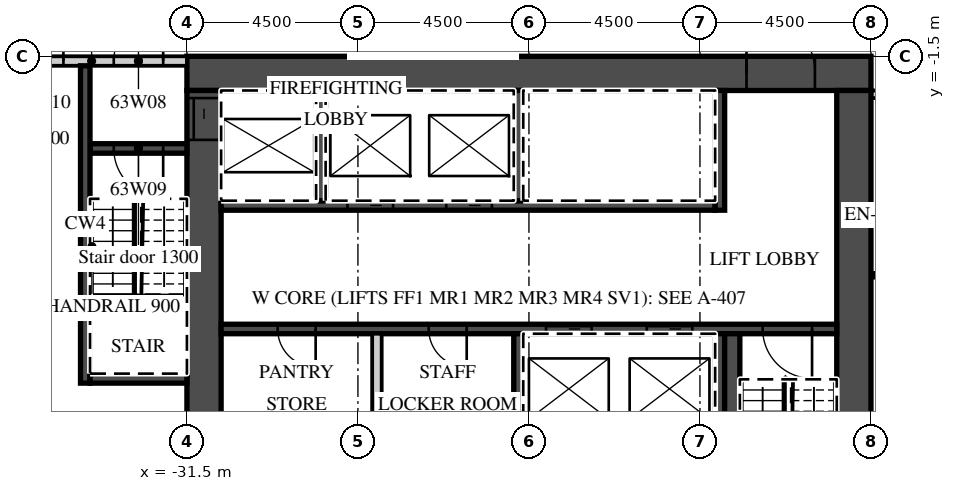
"""IFC4 building model, lengths in metres.
Left out: names, types, materials, properties, quantities, classifications, styles, units other than length and angle.
Written with IfcOpenShell. Run it as: python <this file> out.ifc"""

import sys

from ifc_helpers import new_model, si_unit, direction, frame, frame_2d, origin, place, context, subcontext, project, spatial, rectangle, extrude, element, fill, save


model = new_model("IFC4")
c1 = context("Model", 3, precision=1e-05, world=origin(), true_north=direction((0.0, 1.0)))
c2 = subcontext(c1, "Body", "Model", "MODEL_VIEW")
j1 = project(units=[si_unit("LENGTHUNIT", "METRE"), si_unit("PLANEANGLEUNIT", "RADIAN")], contexts=[c1])
p1 = place(None, origin())
s1 = spatial("IfcSite", under=j1, at=p1, CompositionType="ELEMENT")
p2 = place(p1, origin())
s2 = spatial("IfcBuilding", under=s1, at=p2, CompositionType="ELEMENT")
p3 = place(p2, frame((0.0, 0.0, 254.0)))
s3 = spatial("IfcBuildingStorey", under=s2, at=p3, CompositionType="ELEMENT", Elevation=254.0)
p4 = place(p3, frame((-13.5, -2.5, 0.0), z_axis=(0.0, 0.0, 1.0), x_axis=(1.0, 0.0, 0.0)))
e1 = element("IfcWall", 1, at=p4, inside=s3, PredefinedType="PARTITIONING", context=c2, shape_type="SweptSolid", body=[
    extrude(rectangle(XDim=27.0, YDim=0.2, at=frame_2d((13.5, 0.0))), origin(), (0.0, 0.0, 1.0), 3.0),
])
p5 = place(p4, frame((2.925, 0.0, 0.0)))
e2 = element("IfcOpeningElement", 2, at=p5, cuts=e1, PredefinedType="OPENING", context=c2, shape_type="SweptSolid", body=[
    extrude(rectangle(XDim=1.0, YDim=2.1, at=frame_2d((0.5, 1.05))), frame((0.0, 0.11, 0.0), z_axis=(0.0, -1.0, 0.0), x_axis=(1.0, 0.0, 0.0)), (0.0, 0.0, 1.0), 0.22),
])
p6 = place(p4, frame((6.938, 0.0, 0.0)))
e3 = element("IfcOpeningElement", 3, at=p6, cuts=e1, PredefinedType="OPENING", context=c2, shape_type="SweptSolid", body=[
    extrude(rectangle(XDim=1.2, YDim=2.1, at=frame_2d((0.6, 1.05))), frame((0.0, 0.11, 0.0), z_axis=(0.0, -1.0, 0.0), x_axis=(1.0, 0.0, 0.0)), (0.0, 0.0, 1.0), 0.22),
])
p7 = place(p4, frame((18.862, 0.0, 0.0)))
e4 = element("IfcOpeningElement", 4, at=p7, cuts=e1, PredefinedType="OPENING", context=c2, shape_type="SweptSolid", body=[
    extrude(rectangle(XDim=1.2, YDim=2.1, at=frame_2d((0.6, 1.05))), frame((0.0, 0.11, 0.0), z_axis=(0.0, -1.0, 0.0), x_axis=(1.0, 0.0, 0.0)), (0.0, 0.0, 1.0), 0.22),
])
p8 = place(p4, frame((23.075, 0.0, 0.0)))
e5 = element("IfcOpeningElement", 5, at=p8, cuts=e1, PredefinedType="OPENING", context=c2, shape_type="SweptSolid", body=[
    extrude(rectangle(XDim=1.0, YDim=2.1, at=frame_2d((0.5, 1.05))), frame((0.0, 0.11, 0.0), z_axis=(0.0, -1.0, 0.0), x_axis=(1.0, 0.0, 0.0)), (0.0, 0.0, 1.0), 0.22),
])
p9 = place(p3, frame((-31.5, -1.95, 0.0), z_axis=(0.0, 0.0, 1.0), x_axis=(1.0, 0.0, 0.0)))
e6 = element("IfcWall", 6, at=p9, inside=s3, PredefinedType="SHEAR", context=c2, shape_type="SweptSolid", body=[
    extrude(rectangle(XDim=18.0, YDim=0.9, at=frame_2d((9.0, 0.0))), origin(), (0.0, 0.0, 1.0), 3.0),
])
p10 = place(p9, frame((14.725, 0.0, 0.0)))
e7 = element("IfcOpeningElement", 7, at=p10, cuts=e6, PredefinedType="OPENING", context=c2, shape_type="SweptSolid", body=[
    extrude(rectangle(XDim=1.8, YDim=2.1, at=frame_2d((0.9, 1.05))), frame((0.0, 0.46, 0.0), z_axis=(0.0, -1.0, 0.0), x_axis=(1.0, 0.0, 0.0)), (0.0, 0.0, 1.0), 0.92),
])
p11 = place(p3, frame((-31.05, -15.2, 0.0), z_axis=(0.0, 0.0, 1.0), x_axis=(0.0, 1.0, 0.0)))
e8 = element("IfcWall", 8, at=p11, inside=s3, PredefinedType="SHEAR", context=c2, shape_type="SweptSolid", body=[
    extrude(rectangle(XDim=12.8, YDim=0.9, at=frame_2d((6.4, 0.0))), origin(), (0.0, 0.0, 1.0), 3.0),
])
p12 = place(p11, frame((11.5, 0.0, 0.0)))
e9 = element("IfcOpeningElement", 9, at=p12, cuts=e8, PredefinedType="OPENING", context=c2, shape_type="SweptSolid", body=[
    extrude(rectangle(XDim=1.1, YDim=2.1, at=frame_2d((0.55, 1.05))), frame((0.0, 0.46, 0.0), z_axis=(0.0, -1.0, 0.0), x_axis=(1.0, 0.0, 0.0)), (0.0, 0.0, 1.0), 0.92),
])
p13 = place(p3, frame((-13.95, -14.6, 0.0), z_axis=(0.0, 0.0, 1.0), x_axis=(0.0, 1.0, 0.0)))
e10 = element("IfcWall", 10, at=p13, inside=s3, PredefinedType="SHEAR", context=c2, shape_type="SweptSolid", body=[
    extrude(rectangle(XDim=12.2, YDim=0.9, at=frame_2d((6.1, 0.0))), origin(), (0.0, 0.0, 1.0), 3.0),
])
p14 = place(p3, frame((-30.6, -5.425, 0.0), z_axis=(0.0, 0.0, 1.0), x_axis=(1.0, 0.0, 0.0)))
e11 = element("IfcWall", 11, at=p14, inside=s3, PredefinedType="SHEAR", context=c2, shape_type="SweptSolid", body=[
    extrude(rectangle(XDim=13.0, YDim=0.25, at=frame_2d((6.5, 0.0))), origin(), (0.0, 0.0, 1.0), 3.0),
])
p15 = place(p14, frame((3.325, 0.0, 0.0)))
e12 = element("IfcOpeningElement", 12, at=p15, cuts=e11, PredefinedType="OPENING", context=c2, shape_type="SweptSolid", body=[
    extrude(rectangle(XDim=1.2, YDim=2.1, at=frame_2d((0.6, 1.05))), frame((0.0, 0.135, 0.0), z_axis=(0.0, -1.0, 0.0), x_axis=(1.0, 0.0, 0.0)), (0.0, 0.0, 1.0), 0.27),
])
p16 = place(p14, frame((5.925, 0.0, 0.0)))
e13 = element("IfcOpeningElement", 13, at=p16, cuts=e11, PredefinedType="OPENING", context=c2, shape_type="SweptSolid", body=[
    extrude(rectangle(XDim=1.2, YDim=2.1, at=frame_2d((0.6, 1.05))), frame((0.0, 0.135, 0.0), z_axis=(0.0, -1.0, 0.0), x_axis=(1.0, 0.0, 0.0)), (0.0, 0.0, 1.0), 0.27),
])
p17 = place(p3, frame((-17.475, -5.55, 0.0), z_axis=(0.0, 0.0, 1.0), x_axis=(0.0, 1.0, 0.0)))
e14 = element("IfcWall", 14, at=p17, inside=s3, PredefinedType="SHEAR", context=c2, shape_type="SweptSolid", body=[
    extrude(rectangle(XDim=3.15, YDim=0.25, at=frame_2d((1.575, 0.0))), origin(), (0.0, 0.0, 1.0), 3.0),
])
for number, where, z_axis, x_axis in (
    (15, (-27.975, -5.3, 0.0), (0.0, 0.0, 1.0), (0.0, 1.0, 0.0)),
    (16, (-22.775, -5.3, 0.0), (0.0, 0.0, 1.0), (0.0, 1.0, 0.0)),
):
    element("IfcWall", number, at=place(p3, frame(where, z_axis=z_axis, x_axis=x_axis)), inside=s3, PredefinedType="SHEAR", context=c2, shape_type="SweptSolid", body=[
        extrude(rectangle(XDim=2.9, YDim=0.25, at=frame_2d((1.45, 0.0))), origin(), (0.0, 0.0, 1.0), 3.0),
    ])
p18 = place(p3, frame((-30.6, -8.675, 0.0), z_axis=(0.0, 0.0, 1.0), x_axis=(1.0, 0.0, 0.0)))
e17 = element("IfcWall", 17, at=p18, inside=s3, PredefinedType="SHEAR", context=c2, shape_type="SweptSolid", body=[
    extrude(rectangle(XDim=16.2, YDim=0.25, at=frame_2d((8.1, 0.0))), origin(), (0.0, 0.0, 1.0), 3.0),
])
p19 = place(p18, frame((8.55, 0.0, 0.0)))
e18 = element("IfcOpeningElement", 18, at=p19, cuts=e17, PredefinedType="OPENING", context=c2, shape_type="SweptSolid", body=[
    extrude(rectangle(XDim=1.2, YDim=2.1, at=frame_2d((0.6, 1.05))), frame((0.0, 0.135, 0.0), z_axis=(0.0, -1.0, 0.0), x_axis=(1.0, 0.0, 0.0)), (0.0, 0.0, 1.0), 0.27),
])
p20 = place(p18, frame((11.2, 0.0, 0.0)))
e19 = element("IfcOpeningElement", 19, at=p20, cuts=e17, PredefinedType="OPENING", context=c2, shape_type="SweptSolid", body=[
    extrude(rectangle(XDim=1.2, YDim=2.1, at=frame_2d((0.6, 1.05))), frame((0.0, 0.135, 0.0), z_axis=(0.0, -1.0, 0.0), x_axis=(1.0, 0.0, 0.0)), (0.0, 0.0, 1.0), 0.27),
])
p21 = place(p18, frame((14.25, 0.0, 0.0)))
e20 = element("IfcOpeningElement", 20, at=p21, cuts=e17, PredefinedType="OPENING", context=c2, shape_type="SweptSolid", body=[
    extrude(rectangle(XDim=1.3, YDim=2.1, at=frame_2d((0.65, 1.05))), frame((0.0, 0.135, 0.0), z_axis=(0.0, -1.0, 0.0), x_axis=(1.0, 0.0, 0.0)), (0.0, 0.0, 1.0), 0.27),
])
p22 = place(p18, frame((1.488, 0.0, 0.0)))
e21 = element("IfcOpeningElement", 21, at=p22, cuts=e17, PredefinedType="OPENING", context=c2, shape_type="SweptSolid", body=[
    extrude(rectangle(XDim=1.0, YDim=2.1, at=frame_2d((0.5, 1.05))), frame((0.0, 0.135, 0.0), z_axis=(0.0, -1.0, 0.0), x_axis=(1.0, 0.0, 0.0)), (0.0, 0.0, 1.0), 0.27),
])
p23 = place(p18, frame((5.462, 0.0, 0.0)))
e22 = element("IfcOpeningElement", 22, at=p23, cuts=e17, PredefinedType="OPENING", context=c2, shape_type="SweptSolid", body=[
    extrude(rectangle(XDim=1.0, YDim=2.1, at=frame_2d((0.5, 1.05))), frame((0.0, 0.135, 0.0), z_axis=(0.0, -1.0, 0.0), x_axis=(1.0, 0.0, 0.0)), (0.0, 0.0, 1.0), 0.27),
])
for number, where, z_axis, x_axis in (
    (23, (-17.475, -11.7, 0.0), (0.0, 0.0, 1.0), (0.0, 1.0, 0.0)),
    (24, (-22.775, -11.7, 0.0), (0.0, 0.0, 1.0), (0.0, 1.0, 0.0)),
):
    element("IfcWall", number, at=place(p3, frame(where, z_axis=z_axis, x_axis=x_axis)), inside=s3, PredefinedType="SHEAR", context=c2, shape_type="SweptSolid", body=[
        extrude(rectangle(XDim=2.9, YDim=0.25, at=frame_2d((1.45, 0.0))), origin(), (0.0, 0.0, 1.0), 3.0),
    ])
p24 = place(p3, frame((-26.5, -11.7, 0.0), z_axis=(0.0, 0.0, 1.0), x_axis=(0.0, 1.0, 0.0)))
e25 = element("IfcWall", 25, at=p24, inside=s3, PredefinedType="PARTITIONING", context=c2, shape_type="SweptSolid", body=[
    extrude(rectangle(XDim=2.9, YDim=0.25, at=frame_2d((1.45, 0.0))), origin(), (0.0, 0.0, 1.0), 3.0),
])
p25 = place(p3, frame((-17.15, -14.6, 0.0), z_axis=(0.0, 0.0, 1.0), x_axis=(0.0, 1.0, 0.0)))
e26 = element("IfcWall", 26, at=p25, inside=s3, PredefinedType="SHEAR", context=c2, shape_type="SweptSolid", body=[
    extrude(rectangle(XDim=5.8, YDim=0.4, at=frame_2d((2.9, 0.0))), origin(), (0.0, 0.0, 1.0), 3.0),
])
p26 = place(p3, frame((-36.515, -1.625, 0.0), z_axis=(0.0, 0.0, 1.0), x_axis=(1.0, 0.0, 0.0)))
e27 = element("IfcWall", 27, at=p26, inside=s3, PredefinedType="PARTITIONING", context=c2, shape_type="SweptSolid", body=[
    extrude(rectangle(XDim=5.015, YDim=0.25, at=frame_2d((2.508, 0.0))), origin(), (0.0, 0.0, 1.0), 3.0),
])
p27 = place(p26, frame((3.09, 0.0, 0.0)))
e28 = element("IfcOpeningElement", 28, at=p27, cuts=e27, PredefinedType="OPENING", context=c2, shape_type="SweptSolid", body=[
    extrude(rectangle(XDim=1.3, YDim=2.1, at=frame_2d((0.65, 1.05))), frame((0.0, 0.135, 0.0), z_axis=(0.0, -1.0, 0.0), x_axis=(1.0, 0.0, 0.0)), (0.0, 0.0, 1.0), 0.27),
])
p28 = place(p26, frame((0.665, 0.0, 0.0)))
e29 = element("IfcOpeningElement", 29, at=p28, cuts=e27, PredefinedType="OPENING", context=c2, shape_type="SweptSolid", body=[
    extrude(rectangle(XDim=1.1, YDim=2.1, at=frame_2d((0.55, 1.05))), frame((0.0, 0.135, 0.0), z_axis=(0.0, -1.0, 0.0), x_axis=(1.0, 0.0, 0.0)), (0.0, 0.0, 1.0), 0.27),
])
p29 = place(p3, frame((-34.05, -3.925, 0.0), z_axis=(0.0, 0.0, 1.0), x_axis=(1.0, 0.0, 0.0)))
e30 = element("IfcWall", 30, at=p29, inside=s3, PredefinedType="SHEAR", context=c2, shape_type="SweptSolid", body=[
    extrude(rectangle(XDim=2.55, YDim=0.25, at=frame_2d((1.275, 0.0))), origin(), (0.0, 0.0, 1.0), 3.0),
])
p30 = place(p29, frame((0.625, 0.0, 0.0)))
e31 = element("IfcOpeningElement", 31, at=p30, cuts=e30, PredefinedType="OPENING", context=c2, shape_type="SweptSolid", body=[
    extrude(rectangle(XDim=1.3, YDim=2.1, at=frame_2d((0.65, 1.05))), frame((0.0, 0.135, 0.0), z_axis=(0.0, -1.0, 0.0), x_axis=(1.0, 0.0, 0.0)), (0.0, 0.0, 1.0), 0.27),
])
p31 = place(p3, frame((-34.175, -10.1, 0.0), z_axis=(0.0, 0.0, 1.0), x_axis=(0.0, 1.0, 0.0)))
e32 = element("IfcWall", 32, at=p31, inside=s3, PredefinedType="SHEAR", context=c2, shape_type="SweptSolid", body=[
    extrude(rectangle(XDim=8.35, YDim=0.25, at=frame_2d((4.175, 0.0))), origin(), (0.0, 0.0, 1.0), 3.0),
])
p32 = place(p3, frame((-34.05, -9.975, 0.0), z_axis=(0.0, 0.0, 1.0), x_axis=(1.0, 0.0, 0.0)))
e33 = element("IfcWall", 33, at=p32, inside=s3, PredefinedType="SHEAR", context=c2, shape_type="SweptSolid", body=[
    extrude(rectangle(XDim=2.55, YDim=0.25, at=frame_2d((1.275, 0.0))), origin(), (0.0, 0.0, 1.0), 3.0),
])
p33 = place(p19, origin())
e34 = element("IfcDoor", 34, at=p33, inside=s3, OperationType="SLIDING_TO_LEFT", PredefinedType="DOOR", context=c2, shape_type="SweptSolid", body=[
    extrude(rectangle(XDim=1.2, YDim=2.1, at=frame_2d((0.6, 1.05))), frame((0.0, 0.025, 0.0), z_axis=(0.0, -1.0, 0.0), x_axis=(1.0, 0.0, 0.0)), (0.0, 0.0, 1.0), 0.05),
])
fill(e18, e34)
p34 = place(p20, origin())
e35 = element("IfcDoor", 35, at=p34, inside=s3, OperationType="SLIDING_TO_RIGHT", PredefinedType="DOOR", context=c2, shape_type="SweptSolid", body=[
    extrude(rectangle(XDim=1.2, YDim=2.1, at=frame_2d((0.6, 1.05))), frame((0.0, 0.025, 0.0), z_axis=(0.0, -1.0, 0.0), x_axis=(1.0, 0.0, 0.0)), (0.0, 0.0, 1.0), 0.05),
])
fill(e19, e35)
p35 = place(p15, origin())
e36 = element("IfcDoor", 36, at=p35, inside=s3, OperationType="SLIDING_TO_RIGHT", PredefinedType="DOOR", context=c2, shape_type="SweptSolid", body=[
    extrude(rectangle(XDim=1.2, YDim=2.1, at=frame_2d((0.6, 1.05))), frame((0.0, 0.025, 0.0), z_axis=(0.0, -1.0, 0.0), x_axis=(1.0, 0.0, 0.0)), (0.0, 0.0, 1.0), 0.05),
])
fill(e12, e36)
p36 = place(p16, origin())
e37 = element("IfcDoor", 37, at=p36, inside=s3, OperationType="SLIDING_TO_RIGHT", PredefinedType="DOOR", context=c2, shape_type="SweptSolid", body=[
    extrude(rectangle(XDim=1.2, YDim=2.1, at=frame_2d((0.6, 1.05))), frame((0.0, 0.025, 0.0), z_axis=(0.0, -1.0, 0.0), x_axis=(1.0, 0.0, 0.0)), (0.0, 0.0, 1.0), 0.05),
])
fill(e13, e37)
p37 = place(p12, origin())
e38 = element("IfcDoor", 38, at=p37, inside=s3, OperationType="SLIDING_TO_RIGHT", PredefinedType="DOOR", context=c2, shape_type="SweptSolid", body=[
    extrude(rectangle(XDim=1.1, YDim=2.1, at=frame_2d((0.55, 1.05))), frame((0.0, 0.025, 0.0), z_axis=(0.0, -1.0, 0.0), x_axis=(1.0, 0.0, 0.0)), (0.0, 0.0, 1.0), 0.05),
])
fill(e9, e38)
p38 = place(p10, origin())
e39 = element("IfcDoor", 39, at=p38, inside=s3, OperationType="DOUBLE_DOOR_DOUBLE_SWING", PredefinedType="DOOR", context=c2, shape_type="SweptSolid", body=[
    extrude(rectangle(XDim=1.8, YDim=2.1, at=frame_2d((0.9, 1.05))), frame((0.0, 0.025, 0.0), z_axis=(0.0, -1.0, 0.0), x_axis=(1.0, 0.0, 0.0)), (0.0, 0.0, 1.0), 0.05),
])
fill(e7, e39)
p39 = place(p27, origin())
e40 = element("IfcDoor", 40, at=p39, inside=s3, OperationType="SINGLE_SWING_RIGHT", PredefinedType="DOOR", context=c2, shape_type="SweptSolid", body=[
    extrude(rectangle(XDim=1.3, YDim=2.1, at=frame_2d((0.65, 1.05))), frame((0.0, 0.025, 0.0), z_axis=(0.0, -1.0, 0.0), x_axis=(1.0, 0.0, 0.0)), (0.0, 0.0, 1.0), 0.05),
])
fill(e28, e40)
p40 = place(p30, origin())
e41 = element("IfcDoor", 41, at=p40, inside=s3, OperationType="SINGLE_SWING_RIGHT", PredefinedType="DOOR", context=c2, shape_type="SweptSolid", body=[
    extrude(rectangle(XDim=1.3, YDim=2.1, at=frame_2d((0.65, 1.05))), frame((0.0, 0.025, 0.0), z_axis=(0.0, -1.0, 0.0), x_axis=(1.0, 0.0, 0.0)), (0.0, 0.0, 1.0), 0.05),
])
fill(e31, e41)
p41 = place(p28, origin())
e42 = element("IfcDoor", 42, at=p41, inside=s3, OperationType="SINGLE_SWING_RIGHT", PredefinedType="DOOR", context=c2, shape_type="SweptSolid", body=[
    extrude(rectangle(XDim=1.1, YDim=2.1, at=frame_2d((0.55, 1.05))), frame((0.0, 0.025, 0.0), z_axis=(0.0, -1.0, 0.0), x_axis=(1.0, 0.0, 0.0)), (0.0, 0.0, 1.0), 0.05),
])
fill(e29, e42)
p42 = place(p21, origin())
e43 = element("IfcDoor", 43, at=p42, inside=s3, OperationType="SINGLE_SWING_RIGHT", PredefinedType="DOOR", context=c2, shape_type="SweptSolid", body=[
    extrude(rectangle(XDim=1.3, YDim=2.1, at=frame_2d((0.65, 1.05))), frame((0.0, 0.025, 0.0), z_axis=(0.0, -1.0, 0.0), x_axis=(1.0, 0.0, 0.0)), (0.0, 0.0, 1.0), 0.05),
])
fill(e20, e43)
p43 = place(p22, origin())
e44 = element("IfcDoor", 44, at=p43, inside=s3, OperationType="SINGLE_SWING_RIGHT", PredefinedType="DOOR", context=c2, shape_type="SweptSolid", body=[
    extrude(rectangle(XDim=1.0, YDim=2.1, at=frame_2d((0.5, 1.05))), frame((0.0, 0.025, 0.0), z_axis=(0.0, -1.0, 0.0), x_axis=(1.0, 0.0, 0.0)), (0.0, 0.0, 1.0), 0.05),
])
fill(e21, e44)
p44 = place(p23, origin())
e45 = element("IfcDoor", 45, at=p44, inside=s3, OperationType="SINGLE_SWING_RIGHT", PredefinedType="DOOR", context=c2, shape_type="SweptSolid", body=[
    extrude(rectangle(XDim=1.0, YDim=2.1, at=frame_2d((0.5, 1.05))), frame((0.0, 0.025, 0.0), z_axis=(0.0, -1.0, 0.0), x_axis=(1.0, 0.0, 0.0)), (0.0, 0.0, 1.0), 0.05),
])
fill(e22, e45)
save(model, sys.argv[1])
